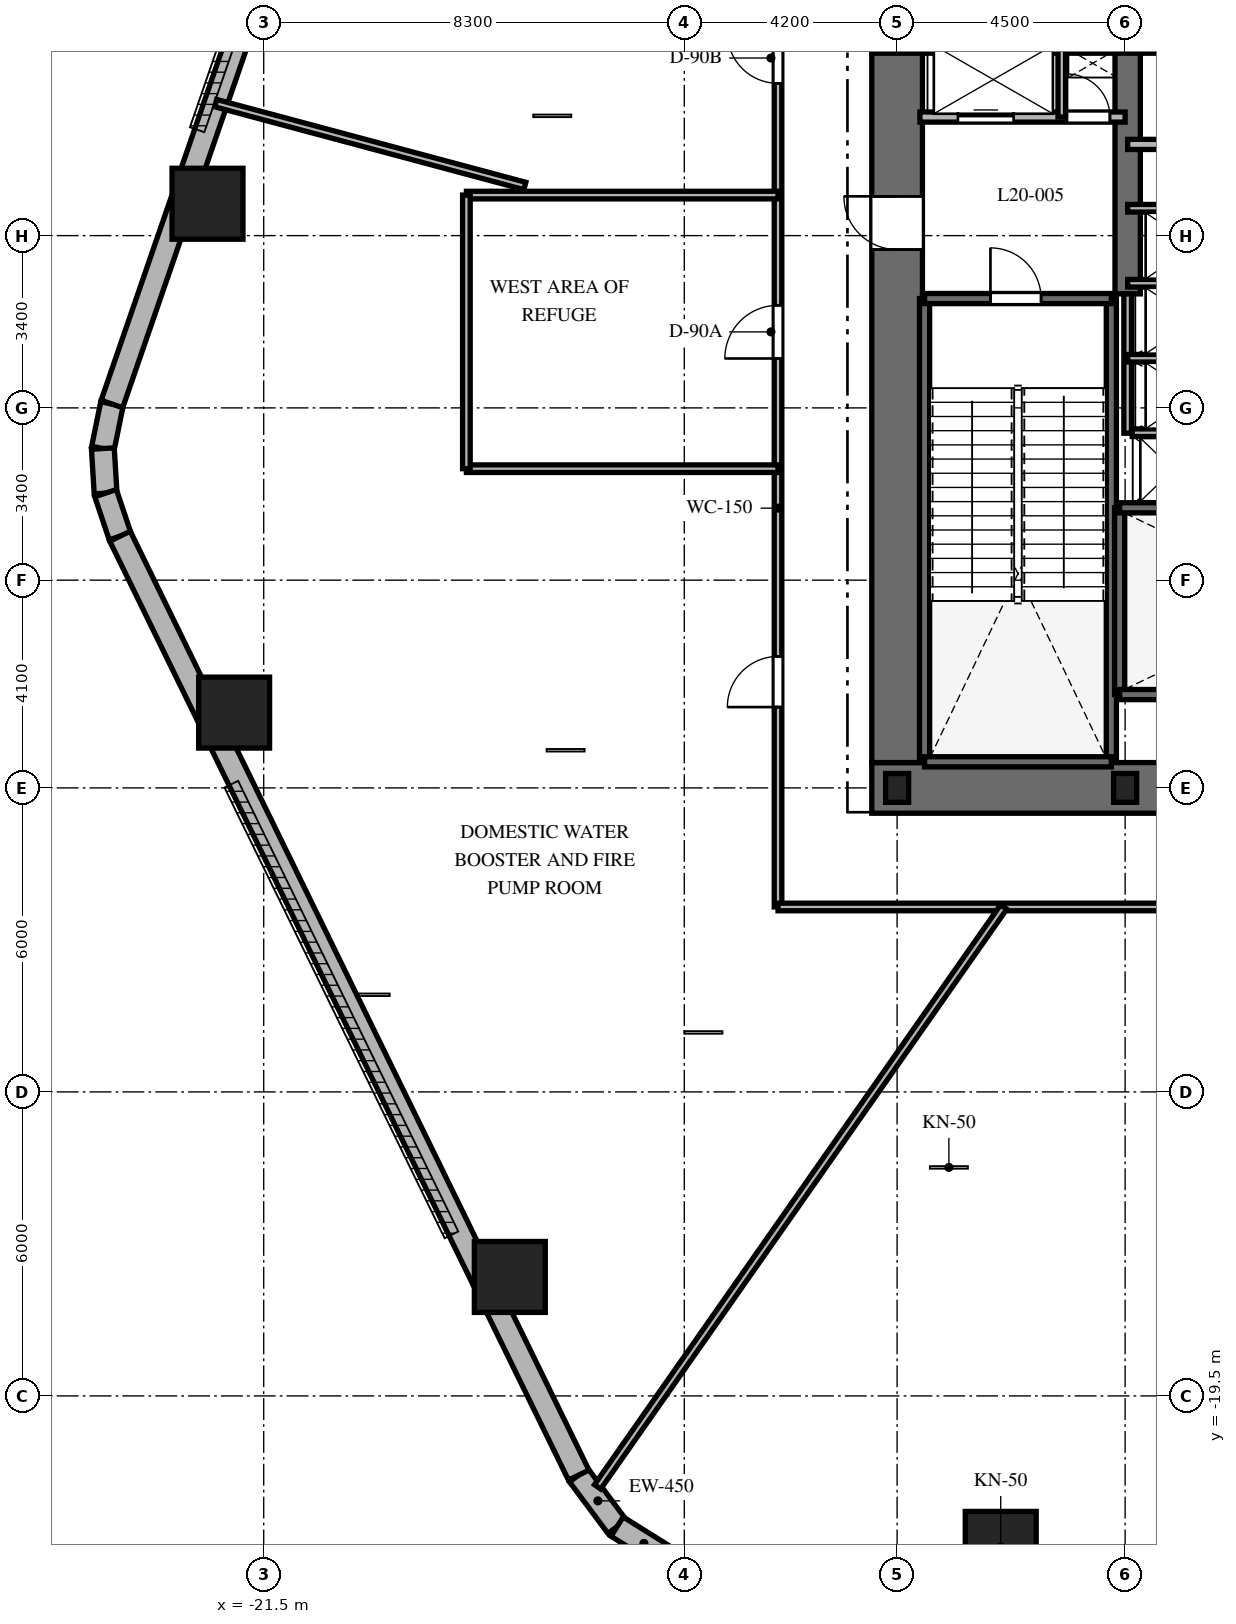
"""IFC4 building model, lengths in metres.
Left out: names, types, materials, properties, quantities, classifications, styles, units other than length and angle.
Written with IfcOpenShell. Run it as: python <this file> out.ifc"""

import sys

from ifc_helpers import new_model, si_unit, direction, frame, frame_2d, origin, origin_2d, place, context, subcontext, project, spatial, rectangle, i_section, extrude, element, fill, save


model = new_model("IFC4")
c1 = context("Model", 3, precision=1e-05, world=origin(), true_north=direction((0.0, 1.0)))
c2 = subcontext(c1, "Body", "Model", "MODEL_VIEW")
j1 = project(units=[si_unit("LENGTHUNIT", "METRE"), si_unit("PLANEANGLEUNIT", "RADIAN")], contexts=[c1])
p1 = place(None, origin())
s1 = spatial("IfcSite", under=j1, at=p1, CompositionType="ELEMENT")
p2 = place(p1, origin())
s2 = spatial("IfcBuilding", under=s1, at=p2, CompositionType="ELEMENT")
p3 = place(p2, frame((0.0, 0.0, 86.0)))
s3 = spatial("IfcBuildingStorey", under=s2, at=p3, CompositionType="ELEMENT", Elevation=86.0)
p4 = place(p3, frame((-9.5, -7.5, 0.0), z_axis=(0.0, 0.0, 1.0), x_axis=(1.0, 0.0, 0.0)))
e1 = element("IfcWall", 1, at=p4, inside=s3, PredefinedType="SHEAR", context=c2, shape_type="SweptSolid", body=[
    extrude(rectangle(XDim=19.0, YDim=1.0, at=frame_2d((9.5, 0.0))), origin(), (0.0, 0.0, 1.0), 5.4),
])
p5 = place(p4, frame((9.55, 0.0, 0.0)))
e2 = element("IfcOpeningElement", 2, at=p5, cuts=e1, PredefinedType="OPENING", context=c2, shape_type="SweptSolid", body=[
    extrude(rectangle(XDim=1.0, YDim=2.15, at=frame_2d((0.5, 1.075))), frame((0.0, 0.51, 0.0), z_axis=(0.0, -1.0, 0.0), x_axis=(1.0, 0.0, 0.0)), (0.0, 0.0, 1.0), 1.02),
])
p6 = place(p3, frame((-9.5, 7.5, 0.0), z_axis=(0.0, 0.0, 1.0), x_axis=(1.0, 0.0, 0.0)))
e3 = element("IfcWall", 3, at=p6, inside=s3, PredefinedType="SHEAR", context=c2, shape_type="SweptSolid", body=[
    extrude(rectangle(XDim=9.55, YDim=1.0, at=frame_2d((4.775, 0.0))), origin(), (0.0, 0.0, 1.0), 5.4),
])
p7 = place(p3, frame((-9.0, -7.0, 0.0), z_axis=(0.0, 0.0, 1.0), x_axis=(0.0, 1.0, 0.0)))
e4 = element("IfcWall", 4, at=p7, inside=s3, PredefinedType="SHEAR", context=c2, shape_type="SweptSolid", body=[
    extrude(rectangle(XDim=14.0, YDim=1.0, at=frame_2d((7.0, 0.0))), origin(), (0.0, 0.0, 1.0), 5.4),
])
p8 = place(p7, frame((10.125, 0.0, 0.0)))
e5 = element("IfcOpeningElement", 5, at=p8, cuts=e4, PredefinedType="OPENING", context=c2, shape_type="SweptSolid", body=[
    extrude(rectangle(XDim=1.05, YDim=2.15, at=frame_2d((0.525, 1.075))), frame((0.0, 0.51, 0.0), z_axis=(0.0, -1.0, 0.0), x_axis=(1.0, 0.0, 0.0)), (0.0, 0.0, 1.0), 1.02),
])
p9 = place(p3, frame((-4.45, 2.25, 0.0), z_axis=(0.0, 0.0, 1.0), x_axis=(0.0, 1.0, 0.0)))
e6 = element("IfcWall", 6, at=p9, inside=s3, PredefinedType="SHEAR", context=c2, shape_type="SweptSolid", body=[
    extrude(rectangle(XDim=4.75, YDim=0.5, at=frame_2d((2.375, 0.0))), origin(), (0.0, 0.0, 1.0), 5.4),
])
for number, where, z_axis, x_axis in (
    (7, (-8.458, -6.985, 0.0), (0.0, 0.0, 1.0), (0.0, 1.0, 0.0)),
    (8, (-4.772, -6.985, 0.0), (0.0, 0.0, 1.0), (0.0, 1.0, 0.0)),
):
    element("IfcWall", number, at=place(p3, frame(where, z_axis=z_axis, x_axis=x_axis)), inside=s3, PredefinedType="SHEAR", context=c2, shape_type="SweptSolid", body=[
        extrude(rectangle(XDim=9.143, YDim=0.2, at=frame_2d((4.572, 0.0))), origin(), (0.0, 0.0, 1.0), 5.4),
    ])
p10 = place(p3, frame((-8.458, -6.985, 0.0), z_axis=(0.0, 0.0, 1.0), x_axis=(1.0, 0.0, 0.0)))
e9 = element("IfcWall", 9, at=p10, inside=s3, PredefinedType="SHEAR", context=c2, shape_type="SweptSolid", body=[
    extrude(rectangle(XDim=3.686, YDim=0.2, at=frame_2d((1.843, 0.0))), origin(), (0.0, 0.0, 1.0), 5.4),
])
p11 = place(p3, frame((-8.458, 2.158, 0.0), z_axis=(0.0, 0.0, 1.0), x_axis=(1.0, 0.0, 0.0)))
e10 = element("IfcWall", 10, at=p11, inside=s3, PredefinedType="SHEAR", context=c2, shape_type="SweptSolid", body=[
    extrude(rectangle(XDim=3.686, YDim=0.2, at=frame_2d((1.843, 0.0))), origin(), (0.0, 0.0, 1.0), 5.4),
])
p12 = place(p11, frame((1.3, 0.0, 0.0)))
e11 = element("IfcOpeningElement", 11, at=p12, cuts=e10, PredefinedType="OPENING", context=c2, shape_type="SweptSolid", body=[
    extrude(rectangle(XDim=1.0, YDim=2.15, at=frame_2d((0.5, 1.075))), frame((0.0, 0.11, 0.0), z_axis=(0.0, -1.0, 0.0), x_axis=(1.0, 0.0, 0.0)), (0.0, 0.0, 1.0), 0.22),
])
p13 = place(p3, frame((-4.608, -5.658, 0.0), z_axis=(0.0, 0.0, 1.0), x_axis=(0.0, 1.0, 0.0)))
e12 = element("IfcWall", 12, at=p13, inside=s3, PredefinedType="SHEAR", context=c2, shape_type="SweptSolid", body=[
    extrude(rectangle(XDim=3.686, YDim=0.2, at=frame_2d((1.843, 0.0))), origin(), (0.0, 0.0, 1.0), 5.4),
])
p14 = place(p3, frame((-4.608, -5.658, 0.0), z_axis=(0.0, 0.0, 1.0), x_axis=(1.0, 0.0, 0.0)))
e13 = element("IfcWall", 13, at=p14, inside=s3, PredefinedType="SHEAR", context=c2, shape_type="SweptSolid", body=[
    extrude(rectangle(XDim=9.166, YDim=0.2, at=frame_2d((4.583, 0.0))), origin(), (0.0, 0.0, 1.0), 5.4),
])
p15 = place(p14, frame((7.45, 0.0, 0.0)))
e14 = element("IfcOpeningElement", 14, at=p15, cuts=e13, PredefinedType="OPENING", context=c2, shape_type="SweptSolid", body=[
    extrude(rectangle(XDim=1.0, YDim=2.15, at=frame_2d((0.5, 1.075))), frame((0.0, 0.11, 0.0), z_axis=(0.0, -1.0, 0.0), x_axis=(1.0, 0.0, 0.0)), (0.0, 0.0, 1.0), 0.22),
])
p16 = place(p3, frame((-4.608, -1.972, 0.0), z_axis=(0.0, 0.0, 1.0), x_axis=(1.0, 0.0, 0.0)))
e15 = element("IfcWall", 15, at=p16, inside=s3, PredefinedType="SHEAR", context=c2, shape_type="SweptSolid", body=[
    extrude(rectangle(XDim=9.166, YDim=0.2, at=frame_2d((4.583, 0.0))), origin(), (0.0, 0.0, 1.0), 5.4),
])
for number, where, z_axis, x_axis in (
    (16, (-9.0, -7.5, 0.0), (0.0, 0.0, 1.0), (1.0, 0.0, 0.0)),
    (17, (-4.5, -7.5, 0.0), (0.0, 0.0, 1.0), (1.0, 0.0, 0.0)),
):
    element("IfcColumn", number, at=place(p3, frame(where, z_axis=z_axis, x_axis=x_axis)), inside=s3, PredefinedType="COLUMN", context=c2, shape_type="SweptSolid", body=[
        extrude(i_section(OverallWidth=0.454, OverallDepth=0.569, WebThickness=0.078, FlangeThickness=0.125, at=origin_2d()), origin(), (0.0, 0.0, 1.0), 5.4),
    ])
for number, where, z_axis, x_axis in (
    (18, (-6.955, -22.48, 0.0), (0.0, 0.0, 1.0), (1.0, 0.0, 0.0)),
    (19, (-22.609, 4.029, 0.0), (0.0, 0.0, 1.0), (1.0, 0.0, 0.0)),
    (20, (-22.084, -6.014, 0.0), (0.0, 0.0, 1.0), (1.0, 0.0, 0.0)),
    (21, (-16.643, -17.152, 0.0), (0.0, 0.0, 1.0), (1.0, 0.0, 0.0)),
):
    element("IfcColumn", number, at=place(p3, frame(where, z_axis=z_axis, x_axis=x_axis)), inside=s3, PredefinedType="COLUMN", context=c2, shape_type="SweptSolid", body=[
        extrude(rectangle(XDim=1.4, YDim=1.4, at=origin_2d()), origin(), (0.0, 0.0, 1.0), 5.4),
    ])
p17 = place(p3, frame((-15.284, -21.062, 0.0), z_axis=(0.0, 0.0, 1.0), x_axis=(0.597595366449, -0.801797841104, 0.0)))
e22 = element("IfcWall", 22, at=p17, inside=s3, PredefinedType="SOLIDWALL", context=c2, shape_type="SweptSolid", body=[
    extrude(rectangle(XDim=1.269, YDim=0.45, at=frame_2d((0.634, 0.0))), origin(), (0.0, 0.0, 1.0), 5.1),
])
p18 = place(p3, frame((-14.526, -22.08, 0.0), z_axis=(0.0, 0.0, 1.0), x_axis=(0.848185203596, -0.529699783275, 0.0)))
e23 = element("IfcWall", 23, at=p18, inside=s3, PredefinedType="SOLIDWALL", context=c2, shape_type="SweptSolid", body=[
    extrude(rectangle(XDim=1.247, YDim=0.45, at=frame_2d((0.624, 0.0))), origin(), (0.0, 0.0, 1.0), 5.1),
])
p19 = place(p3, frame((-24.496, 0.077, 0.0), z_axis=(0.0, 0.0, 1.0), x_axis=(-0.199570594521, -0.979883451132, 0.0)))
e24 = element("IfcWall", 24, at=p19, inside=s3, PredefinedType="SOLIDWALL", context=c2, shape_type="SweptSolid", body=[
    extrude(rectangle(XDim=0.897, YDim=0.45, at=frame_2d((0.448, 0.0))), origin(), (0.0, 0.0, 1.0), 5.1),
])
p20 = place(p3, frame((-24.675, -0.802, 0.0), z_axis=(0.0, 0.0, 1.0), x_axis=(0.061188874166, -0.998126205286, 0.0)))
e25 = element("IfcWall", 25, at=p20, inside=s3, PredefinedType="SOLIDWALL", context=c2, shape_type="SweptSolid", body=[
    extrude(rectangle(XDim=0.882, YDim=0.45, at=frame_2d((0.441, 0.0))), origin(), (0.0, 0.0, 1.0), 5.1),
])
p21 = place(p3, frame((-24.621, -1.682, 0.0), z_axis=(0.0, 0.0, 1.0), x_axis=(0.317697451681, -0.948192137278, 0.0)))
e26 = element("IfcWall", 26, at=p21, inside=s3, PredefinedType="SOLIDWALL", context=c2, shape_type="SweptSolid", body=[
    extrude(rectangle(XDim=0.897, YDim=0.45, at=frame_2d((0.448, 0.0))), origin(), (0.0, 0.0, 1.0), 5.1),
])
p22 = place(p3, frame((-17.39, 20.678, 0.0), z_axis=(0.0, 0.0, 1.0), x_axis=(-0.326068018294, -0.945346310854, 0.0)))
e27 = element("IfcWall", 27, at=p22, inside=s3, PredefinedType="SOLIDWALL", context=c2, shape_type="SweptSolid", body=[
    extrude(rectangle(XDim=21.793, YDim=0.45, at=frame_2d((10.896, 0.0))), origin(), (0.0, 0.0, 1.0), 5.1),
])
p23 = place(p3, frame((-24.336, -2.532, 0.0), z_axis=(0.0, 0.0, 1.0), x_axis=(0.438931326393, -0.898520612291, 0.0)))
e28 = element("IfcWall", 28, at=p23, inside=s3, PredefinedType="SOLIDWALL", context=c2, shape_type="SweptSolid", body=[
    extrude(rectangle(XDim=20.623, YDim=0.45, at=frame_2d((10.312, 0.0))), origin(), (0.0, 0.0, 1.0), 5.1),
])
p24 = place(p3, frame((-8.55, 5.74, 0.0), z_axis=(0.0, 0.0, 1.0), x_axis=(1.0, 0.0, 0.0)))
e29 = element("IfcWall", 29, at=p24, inside=s3, PredefinedType="PARTITIONING", context=c2, shape_type="SweptSolid", body=[
    extrude(rectangle(XDim=4.05, YDim=0.2, at=frame_2d((2.025, 0.0))), origin(), (0.0, 0.0, 1.0), 5.1),
])
p25 = place(p24, frame((0.75, 0.0, 0.0)))
e30 = element("IfcOpeningElement", 30, at=p25, cuts=e29, PredefinedType="OPENING", context=c2, shape_type="SweptSolid", body=[
    extrude(rectangle(XDim=1.1, YDim=2.2, at=frame_2d((0.55, 1.1))), frame((0.0, 0.11, 0.0), z_axis=(0.0, -1.0, 0.0), x_axis=(1.0, 0.0, 0.0)), (0.0, 0.0, 1.0), 0.22),
])
p26 = place(p24, frame((2.9, 0.0, 0.0)))
e31 = element("IfcOpeningElement", 31, at=p26, cuts=e29, PredefinedType="OPENING", context=c2, shape_type="SweptSolid", body=[
    extrude(rectangle(XDim=0.85, YDim=2.03, at=frame_2d((0.425, 1.015))), frame((0.0, 0.11, 0.0), z_axis=(0.0, -1.0, 0.0), x_axis=(1.0, 0.0, 0.0)), (0.0, 0.0, 1.0), 0.22),
])
p27 = place(p3, frame((-5.75, 5.74, 0.0), z_axis=(0.0, 0.0, 1.0), x_axis=(0.0, 1.0, 0.0)))
e32 = element("IfcWall", 32, at=p27, inside=s3, PredefinedType="PARTITIONING", context=c2, shape_type="SweptSolid", body=[
    extrude(rectangle(XDim=1.41, YDim=0.15, at=frame_2d((0.705, 0.0))), origin(), (0.0, 0.0, 1.0), 5.1),
])
p28 = place(p3, frame((-4.45, 5.2, 0.0), z_axis=(0.0, 0.0, 1.0), x_axis=(1.0, 0.0, 0.0)))
e33 = element("IfcWall", 33, at=p28, inside=s3, PredefinedType="PARTITIONING", context=c2, shape_type="SweptSolid", body=[
    extrude(rectangle(XDim=4.5, YDim=0.2, at=frame_2d((2.25, 0.0))), origin(), (0.0, 0.0, 1.0), 5.1),
])
p29 = place(p3, frame((-4.45, -0.5, 0.0), z_axis=(0.0, 0.0, 1.0), x_axis=(0.0, 1.0, 0.0)))
e34 = element("IfcWall", 34, at=p29, inside=s3, PredefinedType="PARTITIONING", context=c2, shape_type="SweptSolid", body=[
    extrude(rectangle(XDim=2.75, YDim=0.15, at=frame_2d((1.375, 0.0))), origin(), (0.0, 0.0, 1.0), 5.1),
])
for number, where, z_axis, x_axis in (
    (35, (-4.45, 3.94, 0.0), (0.0, 0.0, 1.0), (1.0, 0.0, 0.0)),
    (36, (-4.45, 0.98, 0.0), (0.0, 0.0, 1.0), (1.0, 0.0, 0.0)),
    (37, (-4.45, 2.46, 0.0), (0.0, 0.0, 1.0), (1.0, 0.0, 0.0)),
):
    element("IfcWall", number, at=place(p3, frame(where, z_axis=z_axis, x_axis=x_axis)), inside=s3, PredefinedType="PARTITIONING", context=c2, shape_type="SweptSolid", body=[
        extrude(rectangle(XDim=2.55, YDim=0.15, at=frame_2d((1.275, 0.0))), origin(), (0.0, 0.0, 1.0), 5.1),
    ])
p30 = place(p3, frame((-4.36, -0.49, 0.0), z_axis=(0.0, 0.0, 1.0), x_axis=(1.0, 0.0, 0.0)))
e38 = element("IfcWall", 38, at=p30, inside=s3, PredefinedType="PARTITIONING", context=c2, shape_type="SweptSolid", body=[
    extrude(rectangle(XDim=8.72, YDim=0.15, at=frame_2d((4.36, 0.0))), origin(), (0.0, 0.0, 1.0), 5.1),
])
p31 = place(p30, frame((2.81, 0.0, 0.0)))
e39 = element("IfcOpeningElement", 39, at=p31, cuts=e38, PredefinedType="OPENING", context=c2, shape_type="SweptSolid", body=[
    extrude(rectangle(XDim=0.85, YDim=2.03, at=frame_2d((0.425, 1.015))), frame((0.0, 0.085, 0.0), z_axis=(0.0, -1.0, 0.0), x_axis=(1.0, 0.0, 0.0)), (0.0, 0.0, 1.0), 0.17),
])
p32 = place(p30, frame((4.61, 0.0, 0.0)))
e40 = element("IfcOpeningElement", 40, at=p32, cuts=e38, PredefinedType="OPENING", context=c2, shape_type="SweptSolid", body=[
    extrude(rectangle(XDim=0.85, YDim=2.03, at=frame_2d((0.425, 1.015))), frame((0.0, 0.085, 0.0), z_axis=(0.0, -1.0, 0.0), x_axis=(1.0, 0.0, 0.0)), (0.0, 0.0, 1.0), 0.17),
])
p33 = place(p3, frame((-11.35, -9.85, 0.0), z_axis=(0.0, 0.0, 1.0), x_axis=(0.0, 1.0, 0.0)))
e41 = element("IfcWall", 41, at=p33, inside=s3, PredefinedType="PARTITIONING", context=c2, shape_type="SweptSolid", body=[
    extrude(rectangle(XDim=19.7, YDim=0.15, at=frame_2d((9.85, 0.0))), origin(), (0.0, 0.0, 1.0), 3.29),
])
p34 = place(p33, frame((10.825, 0.0, 0.0)))
e42 = element("IfcOpeningElement", 42, at=p34, cuts=e41, PredefinedType="OPENING", context=c2, shape_type="SweptSolid", body=[
    extrude(rectangle(XDim=1.05, YDim=2.15, at=frame_2d((0.525, 1.075))), frame((0.0, 0.085, 0.0), z_axis=(0.0, -1.0, 0.0), x_axis=(1.0, 0.0, 0.0)), (0.0, 0.0, 1.0), 0.17),
])
p35 = place(p33, frame((16.255, 0.0, 0.0)))
e43 = element("IfcOpeningElement", 43, at=p35, cuts=e41, PredefinedType="OPENING", context=c2, shape_type="SweptSolid", body=[
    extrude(rectangle(XDim=1.0, YDim=2.15, at=frame_2d((0.5, 1.075))), frame((0.0, 0.085, 0.0), z_axis=(0.0, -1.0, 0.0), x_axis=(1.0, 0.0, 0.0)), (0.0, 0.0, 1.0), 0.17),
])
p36 = place(p33, frame((3.945, 0.0, 0.0)))
e44 = element("IfcOpeningElement", 44, at=p36, cuts=e41, PredefinedType="OPENING", context=c2, shape_type="SweptSolid", body=[
    extrude(rectangle(XDim=1.0, YDim=2.15, at=frame_2d((0.5, 1.075))), frame((0.0, 0.085, 0.0), z_axis=(0.0, -1.0, 0.0), x_axis=(1.0, 0.0, 0.0)), (0.0, 0.0, 1.0), 0.17),
])
p37 = place(p3, frame((11.35, -9.85, 0.0), z_axis=(0.0, 0.0, 1.0), x_axis=(-1.0, 0.0, 0.0)))
e45 = element("IfcWall", 45, at=p37, inside=s3, PredefinedType="PARTITIONING", context=c2, shape_type="SweptSolid", body=[
    extrude(rectangle(XDim=22.7, YDim=0.15, at=frame_2d((11.35, 0.0))), origin(), (0.0, 0.0, 1.0), 3.29),
])
p38 = place(p37, frame((10.85, 0.0, 0.0)))
e46 = element("IfcOpeningElement", 46, at=p38, cuts=e45, PredefinedType="OPENING", context=c2, shape_type="SweptSolid", body=[
    extrude(rectangle(XDim=1.0, YDim=2.15, at=frame_2d((0.5, 1.075))), frame((0.0, 0.085, 0.0), z_axis=(0.0, -1.0, 0.0), x_axis=(1.0, 0.0, 0.0)), (0.0, 0.0, 1.0), 0.17),
])
for number, where, z_axis, x_axis in (
    (47, (-17.5, -1.2, 0.0), (0.0, 0.0, 1.0), (1.0, 0.0, 0.0)),
    (48, (-17.5, 4.2, 0.0), (0.0, 0.0, 1.0), (1.0, 0.0, 0.0)),
):
    element("IfcWall", number, at=place(p3, frame(where, z_axis=z_axis, x_axis=x_axis)), inside=s3, PredefinedType="PARTITIONING", context=c2, shape_type="SweptSolid", body=[
        extrude(rectangle(XDim=6.15, YDim=0.15, at=frame_2d((3.075, 0.0))), origin(), (0.0, 0.0, 1.0), 4.626),
    ])
p39 = place(p3, frame((-17.5, -1.2, 0.0), z_axis=(0.0, 0.0, 1.0), x_axis=(0.0, 1.0, 0.0)))
e49 = element("IfcWall", 49, at=p39, inside=s3, PredefinedType="PARTITIONING", context=c2, shape_type="SweptSolid", body=[
    extrude(rectangle(XDim=5.4, YDim=0.15, at=frame_2d((2.7, 0.0))), origin(), (0.0, 0.0, 1.0), 5.1),
])
p40 = place(p3, frame((-16.346, 4.38, 0.0), z_axis=(0.0, 0.0, 1.0), x_axis=(-0.965923723189, 0.258826893852, 0.0)))
e50 = element("IfcWall", 50, at=p40, inside=s3, PredefinedType="PARTITIONING", context=c2, shape_type="SweptSolid", body=[
    extrude(rectangle(XDim=6.316, YDim=0.15, at=frame_2d((3.158, 0.0))), origin(), (0.0, 0.0, 1.0), 3.29),
])
p41 = place(p3, frame((-6.897, -9.85, 0.0), z_axis=(0.0, 0.0, 1.0), x_axis=(-0.573584304237, -0.81914653508, 0.0)))
e51 = element("IfcWall", 51, at=p41, inside=s3, PredefinedType="PARTITIONING", context=c2, shape_type="SweptSolid", body=[
    extrude(rectangle(XDim=13.972, YDim=0.15, at=frame_2d((6.986, 0.0))), origin(), (0.0, 0.0, 1.0), 3.29),
])
p42 = place(p12, origin())
e52 = element("IfcDoor", 52, at=p42, inside=s3, OperationType="SINGLE_SWING_LEFT", PredefinedType="DOOR", context=c2, shape_type="SweptSolid", body=[
    extrude(rectangle(XDim=1.0, YDim=2.15, at=frame_2d((0.5, 1.075))), frame((0.0, 0.025, 0.0), z_axis=(0.0, -1.0, 0.0), x_axis=(1.0, 0.0, 0.0)), (0.0, 0.0, 1.0), 0.05),
])
fill(e11, e52)
p43 = place(p8, origin())
e53 = element("IfcDoor", 53, at=p43, inside=s3, OperationType="SINGLE_SWING_RIGHT", PredefinedType="DOOR", context=c2, shape_type="SweptSolid", body=[
    extrude(rectangle(XDim=1.05, YDim=2.15, at=frame_2d((0.525, 1.075))), frame((0.0, 0.025, 0.0), z_axis=(0.0, -1.0, 0.0), x_axis=(1.0, 0.0, 0.0)), (0.0, 0.0, 1.0), 0.05),
])
fill(e5, e53)
p44 = place(p25, origin())
e54 = element("IfcDoor", 54, at=p44, inside=s3, OperationType="SLIDING_TO_LEFT", PredefinedType="DOOR", context=c2, shape_type="SweptSolid", body=[
    extrude(rectangle(XDim=1.1, YDim=2.2, at=frame_2d((0.55, 1.1))), frame((0.0, 0.025, 0.0), z_axis=(0.0, -1.0, 0.0), x_axis=(1.0, 0.0, 0.0)), (0.0, 0.0, 1.0), 0.05),
])
fill(e30, e54)
p45 = place(p26, origin())
e55 = element("IfcDoor", 55, at=p45, inside=s3, OperationType="SINGLE_SWING_LEFT", PredefinedType="DOOR", context=c2, shape_type="SweptSolid", body=[
    extrude(rectangle(XDim=0.85, YDim=2.03, at=frame_2d((0.425, 1.015))), frame((0.0, 0.025, 0.0), z_axis=(0.0, -1.0, 0.0), x_axis=(1.0, 0.0, 0.0)), (0.0, 0.0, 1.0), 0.05),
])
fill(e31, e55)
p46 = place(p34, origin())
e56 = element("IfcDoor", 56, at=p46, inside=s3, OperationType="SINGLE_SWING_LEFT", PredefinedType="DOOR", context=c2, shape_type="SweptSolid", body=[
    extrude(rectangle(XDim=1.05, YDim=2.15, at=frame_2d((0.525, 1.075))), frame((0.0, 0.025, 0.0), z_axis=(0.0, -1.0, 0.0), x_axis=(1.0, 0.0, 0.0)), (0.0, 0.0, 1.0), 0.05),
])
fill(e42, e56)
p47 = place(p35, origin())
e57 = element("IfcDoor", 57, at=p47, inside=s3, OperationType="SINGLE_SWING_RIGHT", PredefinedType="DOOR", context=c2, shape_type="SweptSolid", body=[
    extrude(rectangle(XDim=1.0, YDim=2.15, at=frame_2d((0.5, 1.075))), frame((0.0, 0.025, 0.0), z_axis=(0.0, -1.0, 0.0), x_axis=(1.0, 0.0, 0.0)), (0.0, 0.0, 1.0), 0.05),
])
fill(e43, e57)
p48 = place(p36, origin())
e58 = element("IfcDoor", 58, at=p48, inside=s3, OperationType="SINGLE_SWING_LEFT", PredefinedType="DOOR", context=c2, shape_type="SweptSolid", body=[
    extrude(rectangle(XDim=1.0, YDim=2.15, at=frame_2d((0.5, 1.075))), frame((0.0, 0.025, 0.0), z_axis=(0.0, -1.0, 0.0), x_axis=(1.0, 0.0, 0.0)), (0.0, 0.0, 1.0), 0.05),
])
fill(e44, e58)
save(model, sys.argv[1])
